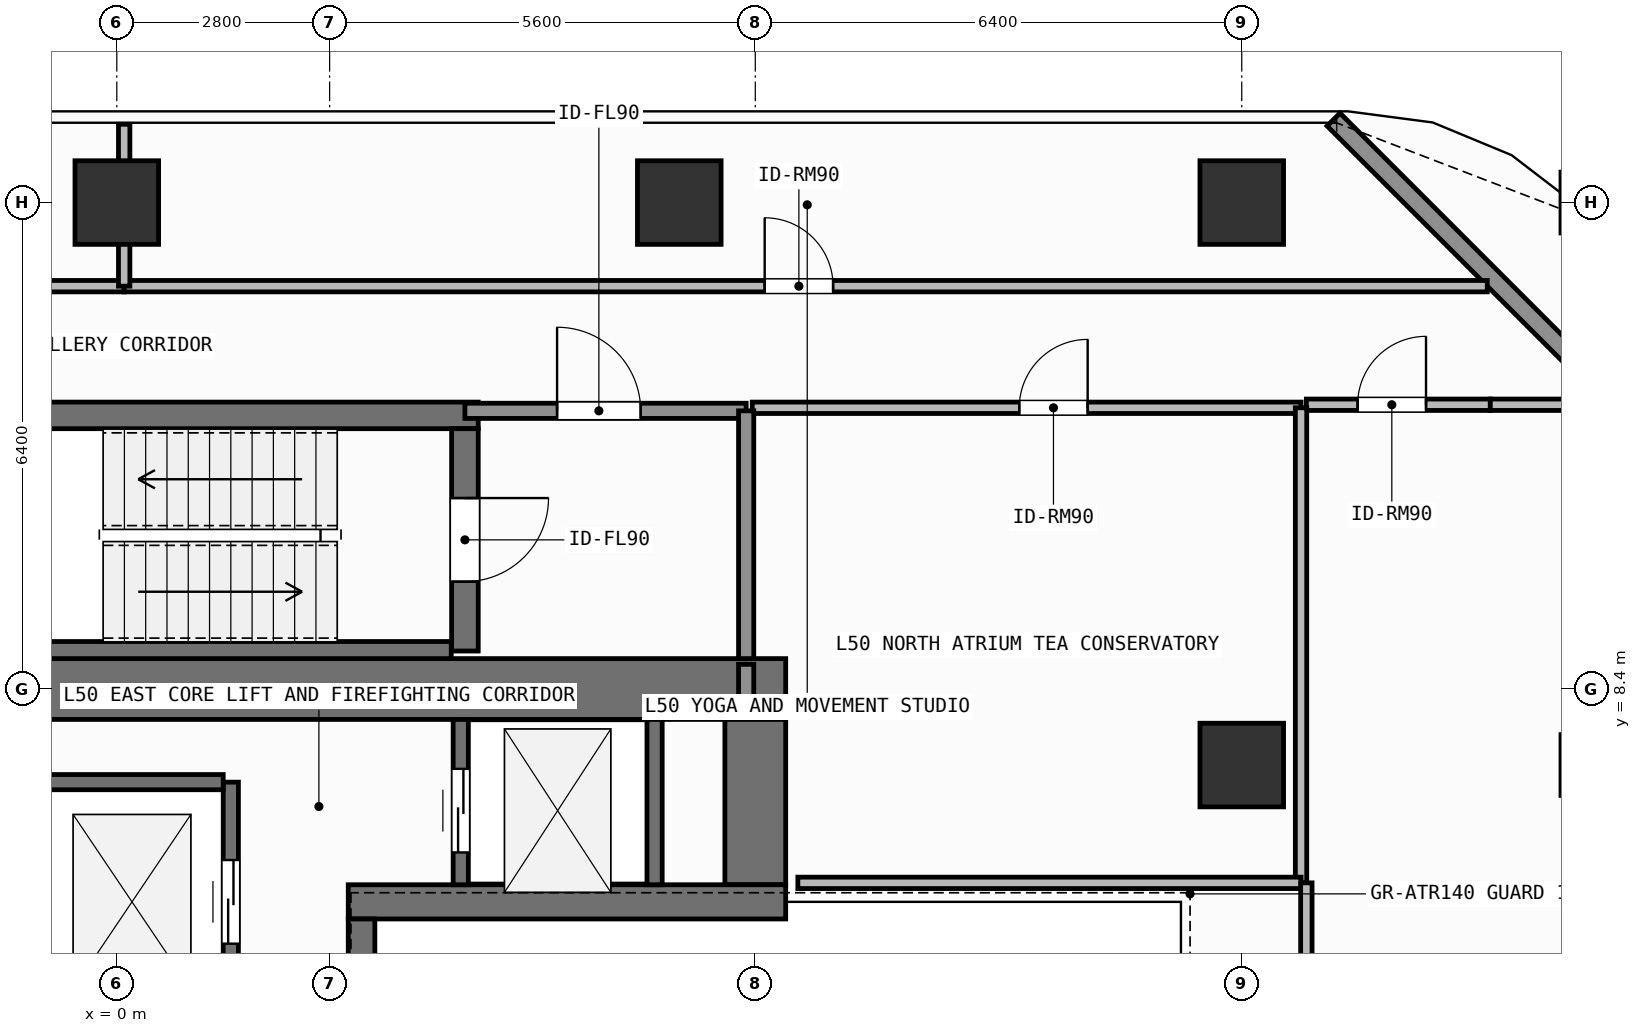
"""IFC4 building model, lengths in metres.
Left out: names, types, materials, properties, quantities, classifications, styles, units other than length and angle.
Written with IfcOpenShell. Run it as: python <this file> out.ifc"""

import sys

from ifc_helpers import new_model, si_unit, direction, frame, frame_2d, origin, origin_2d, place, context, subcontext, project, spatial, rectangle, hollow_rectangle, extrude, element, fill, save


model = new_model("IFC4")
c1 = context("Model", 3, precision=1e-05, world=origin(), true_north=direction((0.0, 1.0)))
c2 = subcontext(c1, "Body", "Model", "MODEL_VIEW")
j1 = project(units=[si_unit("LENGTHUNIT", "METRE"), si_unit("PLANEANGLEUNIT", "RADIAN")], contexts=[c1])
p1 = place(None, origin())
s1 = spatial("IfcSite", under=j1, at=p1, CompositionType="ELEMENT")
p2 = place(p1, origin())
s2 = spatial("IfcBuilding", under=s1, at=p2, CompositionType="ELEMENT")
p3 = place(p2, frame((0.0, 0.0, 203.1)))
s3 = spatial("IfcBuildingStorey", under=s2, at=p3, CompositionType="ELEMENT", Elevation=203.1)
p4 = place(p3, frame((-7.55, 8.4, 0.0), z_axis=(0.0, 0.0, 1.0), x_axis=(1.0, 0.0, 0.0)))
e1 = element("IfcWall", 1, at=p4, inside=s3, PredefinedType="SHEAR", context=c2, shape_type="SweptSolid", body=[
    extrude(rectangle(XDim=16.35, YDim=0.8, at=frame_2d((8.175, 0.0))), origin(), (0.0, 0.0, 1.0), 3.9),
])
p5 = place(p3, frame((8.4, 5.825, 0.0), z_axis=(0.0, 0.0, 1.0), x_axis=(0.0, 1.0, 0.0)))
e2 = element("IfcWall", 2, at=p5, inside=s3, PredefinedType="SHEAR", context=c2, shape_type="SweptSolid", body=[
    extrude(rectangle(XDim=2.175, YDim=0.8, at=frame_2d((1.087, 0.0))), origin(), (0.0, 0.0, 1.0), 3.9),
])
p6 = place(p3, frame((3.045, 5.6, 0.0), z_axis=(0.0, 0.0, 1.0), x_axis=(1.0, 0.0, 0.0)))
e3 = element("IfcWall", 3, at=p6, inside=s3, PredefinedType="SHEAR", context=c2, shape_type="SweptSolid", body=[
    extrude(rectangle(XDim=5.755, YDim=0.45, at=frame_2d((2.877, 0.0))), origin(), (0.0, 0.0, 1.0), 3.9),
])
p7 = place(p3, frame((3.22, -5.375, 0.0), z_axis=(0.0, 0.0, 1.0), x_axis=(0.0, 1.0, 0.0)))
e4 = element("IfcWall", 4, at=p7, inside=s3, PredefinedType="SHEAR", context=c2, shape_type="SweptSolid", body=[
    extrude(rectangle(XDim=10.75, YDim=0.35, at=frame_2d((5.375, 0.0))), origin(), (0.0, 0.0, 1.0), 3.9),
])
p8 = place(p3, frame((-2.555, 12.0, 0.0), z_axis=(0.0, 0.0, 1.0), x_axis=(1.0, 0.0, 0.0)))
e5 = element("IfcWall", 5, at=p8, inside=s3, PredefinedType="SHEAR", context=c2, shape_type="SweptSolid", body=[
    extrude(rectangle(XDim=7.31, YDim=0.35, at=frame_2d((3.655, 0.0))), origin(), (0.0, 0.0, 1.0), 3.9),
])
p9 = place(p3, frame((-2.2, 8.913, 0.0), z_axis=(0.0, 0.0, 1.0), x_axis=(1.0, 0.0, 0.0)))
e6 = element("IfcWall", 6, at=p9, inside=s3, PredefinedType="SHEAR", context=c2, shape_type="SweptSolid", body=[
    extrude(rectangle(XDim=6.6, YDim=0.225, at=frame_2d((3.3, 0.0))), origin(), (0.0, 0.0, 1.0), 3.9),
])
p10 = place(p3, frame((4.58, 11.825, 0.0), z_axis=(0.0, 0.0, 1.0), x_axis=(0.0, -1.0, 0.0)))
e7 = element("IfcWall", 7, at=p10, inside=s3, PredefinedType="SHEAR", context=c2, shape_type="SweptSolid", body=[
    extrude(rectangle(XDim=2.925, YDim=0.35, at=frame_2d((1.462, 0.0))), origin(), (0.0, 0.0, 1.0), 3.9),
])
p11 = place(p10, frame((0.913, 0.0, 0.0)))
e8 = element("IfcOpeningElement", 8, at=p11, cuts=e7, PredefinedType="OPENING", context=c2, shape_type="SweptSolid", body=[
    extrude(rectangle(XDim=1.1, YDim=2.15, at=frame_2d((0.55, 1.075))), frame((0.0, 0.185, 0.0), z_axis=(0.0, -1.0, 0.0), x_axis=(1.0, 0.0, 0.0)), (0.0, 0.0, 1.0), 0.37),
])
for number, where, z_axis, x_axis in (
    (9, (0.0, 14.8, 0.0), (0.0, 0.0, 1.0), (1.0, 0.0, 0.0)),
    (10, (7.4, 14.8, 0.0), (0.0, 0.0, 1.0), (1.0, 0.0, 0.0)),
    (11, (14.8, 14.8, 0.0), (0.0, 0.0, 1.0), (1.0, 0.0, 0.0)),
    (12, (14.8, 7.4, 0.0), (0.0, 0.0, 1.0), (1.0, 0.0, 0.0)),
):
    element("IfcColumn", number, at=place(p3, frame(where, z_axis=z_axis, x_axis=x_axis)), inside=s3, PredefinedType="COLUMN", context=c2, shape_type="SweptSolid", body=[
        extrude(rectangle(XDim=1.1, YDim=1.1, at=origin_2d()), origin(), (0.0, 0.0, 1.0), 3.9),
    ])
for number, where, z_axis, x_axis in (
    (13, (19.4, 7.4, 0.0), (0.0, 0.0, 1.0), (1.0, 0.0, 0.0)),
    (14, (19.4, 14.8, 0.0), (0.0, 0.0, 1.0), (1.0, 0.0, 0.0)),
):
    element("IfcColumn", number, at=place(p3, frame(where, z_axis=z_axis, x_axis=x_axis)), inside=s3, PredefinedType="COLUMN", context=c2, shape_type="SweptSolid", body=[
        extrude(hollow_rectangle(XDim=0.8, YDim=0.8, WallThickness=0.036, at=origin_2d()), origin(), (0.0, 0.0, 1.0), 3.9),
    ])
p12 = place(p3, frame((16.008, 15.892, 0.0), z_axis=(0.0, 0.0, 1.0), x_axis=(0.707106781187, -0.707106781187, 0.0)))
e15 = element("IfcWall", 15, at=p12, inside=s3, PredefinedType="SOLIDWALL", context=c2, shape_type="SweptSolid", body=[
    extrude(rectangle(XDim=6.201, YDim=0.24, at=frame_2d((3.101, 0.0))), origin(), (0.0, 0.0, 1.0), 3.68),
])
p13 = place(p3, frame((1.5, 4.025, 0.0), z_axis=(0.0, 0.0, 1.0), x_axis=(0.0, 1.0, 0.0)))
e16 = element("IfcWall", 16, at=p13, inside=s3, PredefinedType="SHEAR", context=c2, shape_type="SweptSolid", body=[
    extrude(rectangle(XDim=3.15, YDim=0.2, at=frame_2d((1.575, 0.0))), origin(), (0.0, 0.0, 1.0), 3.68),
])
p14 = place(p13, frame((1.025, 0.0, 0.0)))
e17 = element("IfcOpeningElement", 17, at=p14, cuts=e16, PredefinedType="OPENING", context=c2, shape_type="SweptSolid", body=[
    extrude(rectangle(XDim=1.1, YDim=2.2, at=frame_2d((0.55, 1.1))), frame((0.0, 0.11, 0.0), z_axis=(0.0, -1.0, 0.0), x_axis=(1.0, 0.0, 0.0)), (0.0, 0.0, 1.0), 0.22),
])
p15 = place(p3, frame((-1.0, 7.175, 0.0), z_axis=(0.0, 0.0, 1.0), x_axis=(1.0, 0.0, 0.0)))
e18 = element("IfcWall", 18, at=p15, inside=s3, PredefinedType="SHEAR", context=c2, shape_type="SweptSolid", body=[
    extrude(rectangle(XDim=2.4, YDim=0.2, at=frame_2d((1.2, 0.0))), origin(), (0.0, 0.0, 1.0), 3.68),
])
p16 = place(p3, frame((4.525, 5.825, 0.0), z_axis=(0.0, 0.0, 1.0), x_axis=(0.0, 1.0, 0.0)))
e19 = element("IfcWall", 19, at=p16, inside=s3, PredefinedType="SHEAR", context=c2, shape_type="SweptSolid", body=[
    extrude(rectangle(XDim=2.175, YDim=0.2, at=frame_2d((1.087, 0.0))), origin(), (0.0, 0.0, 1.0), 3.68),
])
p17 = place(p16, frame((0.425, 0.0, 0.0)))
e20 = element("IfcOpeningElement", 20, at=p17, cuts=e19, PredefinedType="OPENING", context=c2, shape_type="SweptSolid", body=[
    extrude(rectangle(XDim=1.1, YDim=2.2, at=frame_2d((0.55, 1.1))), frame((0.0, 0.11, 0.0), z_axis=(0.0, -1.0, 0.0), x_axis=(1.0, 0.0, 0.0)), (0.0, 0.0, 1.0), 0.22),
])
p18 = place(p3, frame((7.075, 5.825, 0.0), z_axis=(0.0, 0.0, 1.0), x_axis=(0.0, 1.0, 0.0)))
e21 = element("IfcWall", 21, at=p18, inside=s3, PredefinedType="SHEAR", context=c2, shape_type="SweptSolid", body=[
    extrude(rectangle(XDim=2.175, YDim=0.2, at=frame_2d((1.087, 0.0))), origin(), (0.0, 0.0, 1.0), 3.68),
])
p19 = place(p3, frame((4.58, 12.06, 0.0), z_axis=(0.0, 0.0, 1.0), x_axis=(1.0, 0.0, 0.0)))
e22 = element("IfcWall", 22, at=p19, inside=s3, PredefinedType="SOLIDWALL", context=c2, shape_type="SweptSolid", body=[
    extrude(rectangle(XDim=3.7, YDim=0.2, at=frame_2d((1.85, 0.0))), origin(), (0.0, 0.0, 1.0), 3.68),
])
p20 = place(p19, frame((1.212, 0.0, 0.0)))
e23 = element("IfcOpeningElement", 23, at=p20, cuts=e22, PredefinedType="OPENING", context=c2, shape_type="SweptSolid", body=[
    extrude(rectangle(XDim=1.1, YDim=2.15, at=frame_2d((0.55, 1.075))), frame((0.0, 0.11, 0.0), z_axis=(0.0, -1.0, 0.0), x_axis=(1.0, 0.0, 0.0)), (0.0, 0.0, 1.0), 0.22),
])
p21 = place(p3, frame((8.36, 12.1, 0.0), z_axis=(0.0, 0.0, 1.0), x_axis=(1.0, 0.0, 0.0)))
e24 = element("IfcWall", 24, at=p21, inside=s3, PredefinedType="PARTITIONING", context=c2, shape_type="SweptSolid", body=[
    extrude(rectangle(XDim=7.22, YDim=0.15, at=frame_2d((3.61, 0.0))), origin(), (0.0, 0.0, 1.0), 3.68),
])
p22 = place(p21, frame((3.513, 0.0, 0.0)))
e25 = element("IfcOpeningElement", 25, at=p22, cuts=e24, PredefinedType="OPENING", context=c2, shape_type="SweptSolid", body=[
    extrude(rectangle(XDim=0.9, YDim=2.1, at=frame_2d((0.45, 1.05))), frame((0.0, 0.085, 0.0), z_axis=(0.0, -1.0, 0.0), x_axis=(1.0, 0.0, 0.0)), (0.0, 0.0, 1.0), 0.17),
])
p23 = place(p3, frame((-13.483, 13.7, 0.0), z_axis=(0.0, 0.0, 1.0), x_axis=(1.0, 0.0, 0.0)))
e26 = element("IfcWall", 26, at=p23, inside=s3, PredefinedType="PARTITIONING", context=c2, shape_type="SweptSolid", body=[
    extrude(rectangle(XDim=13.58, YDim=0.15, at=frame_2d((6.79, 0.0))), origin(), (0.0, 0.0, 1.0), 3.68),
])
p24 = place(p23, frame((6.788, 0.0, 0.0)))
e27 = element("IfcOpeningElement", 27, at=p24, cuts=e26, PredefinedType="OPENING", context=c2, shape_type="SweptSolid", body=[
    extrude(rectangle(XDim=0.9, YDim=2.1, at=frame_2d((0.45, 1.05))), frame((0.0, 0.085, 0.0), z_axis=(0.0, -1.0, 0.0), x_axis=(1.0, 0.0, 0.0)), (0.0, 0.0, 1.0), 0.17),
])
p25 = place(p3, frame((0.097, 13.7, 0.0), z_axis=(0.0, 0.0, 1.0), x_axis=(1.0, 0.0, 0.0)))
e28 = element("IfcWall", 28, at=p25, inside=s3, PredefinedType="PARTITIONING", context=c2, shape_type="SweptSolid", body=[
    extrude(rectangle(XDim=17.933, YDim=0.15, at=frame_2d((8.967, 0.0))), origin(), (0.0, 0.0, 1.0), 3.68),
])
p26 = place(p25, frame((8.427, 0.0, 0.0)))
e29 = element("IfcOpeningElement", 29, at=p26, cuts=e28, PredefinedType="OPENING", context=c2, shape_type="SweptSolid", body=[
    extrude(rectangle(XDim=0.9, YDim=2.1, at=frame_2d((0.45, 1.05))), frame((0.0, 0.085, 0.0), z_axis=(0.0, -1.0, 0.0), x_axis=(1.0, 0.0, 0.0)), (0.0, 0.0, 1.0), 0.17),
])
p27 = place(p3, frame((15.65, 12.14, 0.0), z_axis=(0.0, 0.0, 1.0), x_axis=(1.0, 0.0, 0.0)))
e30 = element("IfcWall", 30, at=p27, inside=s3, PredefinedType="PARTITIONING", context=c2, shape_type="SweptSolid", body=[
    extrude(rectangle(XDim=2.42, YDim=0.15, at=frame_2d((1.21, 0.0))), origin(), (0.0, 0.0, 1.0), 3.68),
])
p28 = place(p27, frame((0.674, 0.0, 0.0)))
e31 = element("IfcOpeningElement", 31, at=p28, cuts=e30, PredefinedType="OPENING", context=c2, shape_type="SweptSolid", body=[
    extrude(rectangle(XDim=0.9, YDim=2.1, at=frame_2d((0.45, 1.05))), frame((0.0, 0.085, 0.0), z_axis=(0.0, -1.0, 0.0), x_axis=(1.0, 0.0, 0.0)), (0.0, 0.0, 1.0), 0.17),
])
p29 = place(p3, frame((8.28, 8.8, 0.0), z_axis=(0.0, 0.0, 1.0), x_axis=(0.0, 1.0, 0.0)))
e32 = element("IfcWall", 32, at=p29, inside=s3, PredefinedType="SOLIDWALL", context=c2, shape_type="SweptSolid", body=[
    extrude(rectangle(XDim=3.26, YDim=0.2, at=frame_2d((1.63, 0.0))), origin(), (0.0, 0.0, 1.0), 3.68),
])
p30 = place(p3, frame((8.28, 8.1, 0.0), z_axis=(0.0, 0.0, 1.0), x_axis=(0.0, 1.0, 0.0)))
e33 = element("IfcWall", 33, at=p30, inside=s3, PredefinedType="SOLIDWALL", context=c2, shape_type="SweptSolid", body=[
    extrude(rectangle(XDim=0.625, YDim=0.2, at=frame_2d((0.312, 0.0))), origin(), (0.0, 0.0, 1.0), 3.68),
])
p31 = place(p3, frame((15.58, 5.85, 0.0), z_axis=(0.0, 0.0, 1.0), x_axis=(0.0, 1.0, 0.0)))
e34 = element("IfcWall", 34, at=p31, inside=s3, PredefinedType="PARTITIONING", context=c2, shape_type="SweptSolid", body=[
    extrude(rectangle(XDim=6.25, YDim=0.15, at=frame_2d((3.125, 0.0))), origin(), (0.0, 0.0, 1.0), 3.68),
])
p32 = place(p3, frame((8.96, 5.85, 0.0), z_axis=(0.0, 0.0, 1.0), x_axis=(1.0, 0.0, 0.0)))
e35 = element("IfcWall", 35, at=p32, inside=s3, PredefinedType="PARTITIONING", context=c2, shape_type="SweptSolid", body=[
    extrude(rectangle(XDim=6.62, YDim=0.15, at=frame_2d((3.31, 0.0))), origin(), (0.0, 0.0, 1.0), 3.68),
])
p33 = place(p3, frame((0.097, 13.7, 0.0), z_axis=(0.0, 0.0, 1.0), x_axis=(0.0, 1.0, 0.0)))
e36 = element("IfcWall", 36, at=p33, inside=s3, PredefinedType="PARTITIONING", context=c2, shape_type="SweptSolid", body=[
    extrude(rectangle(XDim=2.13, YDim=0.15, at=frame_2d((1.065, 0.0))), origin(), (0.0, 0.0, 1.0), 3.68),
])
p34 = place(p3, frame((15.65, -2.75, 0.0), z_axis=(0.0, 0.0, 1.0), x_axis=(0.0, 1.0, 0.0)))
e37 = element("IfcWall", 37, at=p34, inside=s3, PredefinedType="PARTITIONING", context=c2, shape_type="SweptSolid", body=[
    extrude(rectangle(XDim=8.6, YDim=0.15, at=frame_2d((4.3, 0.0))), origin(), (0.0, 0.0, 1.0), 3.68),
])
p35 = place(p3, frame((18.07, 12.14, 0.0), z_axis=(0.0, 0.0, 1.0), x_axis=(1.0, 0.0, 0.0)))
e38 = element("IfcWall", 38, at=p35, inside=s3, PredefinedType="PARTITIONING", context=c2, shape_type="SweptSolid", body=[
    extrude(rectangle(XDim=1.52, YDim=0.15, at=frame_2d((0.76, 0.0))), origin(), (0.0, 0.0, 1.0), 3.68),
])
p36 = place(p14, origin())
e39 = element("IfcDoor", 39, at=p36, inside=s3, OperationType="SLIDING_TO_LEFT", PredefinedType="DOOR", context=c2, shape_type="SweptSolid", body=[
    extrude(rectangle(XDim=1.1, YDim=2.2, at=frame_2d((0.55, 1.1))), frame((0.0, 0.025, 0.0), z_axis=(0.0, -1.0, 0.0), x_axis=(1.0, 0.0, 0.0)), (0.0, 0.0, 1.0), 0.05),
])
fill(e17, e39)
p37 = place(p17, origin())
e40 = element("IfcDoor", 40, at=p37, inside=s3, OperationType="SLIDING_TO_LEFT", PredefinedType="DOOR", context=c2, shape_type="SweptSolid", body=[
    extrude(rectangle(XDim=1.1, YDim=2.2, at=frame_2d((0.55, 1.1))), frame((0.0, 0.025, 0.0), z_axis=(0.0, -1.0, 0.0), x_axis=(1.0, 0.0, 0.0)), (0.0, 0.0, 1.0), 0.05),
])
fill(e20, e40)
p38 = place(p11, origin())
e41 = element("IfcDoor", 41, at=p38, inside=s3, OperationType="SINGLE_SWING_LEFT", PredefinedType="DOOR", context=c2, shape_type="SweptSolid", body=[
    extrude(rectangle(XDim=1.1, YDim=2.15, at=frame_2d((0.55, 1.075))), frame((0.0, 0.025, 0.0), z_axis=(0.0, -1.0, 0.0), x_axis=(1.0, 0.0, 0.0)), (0.0, 0.0, 1.0), 0.05),
])
fill(e8, e41)
p39 = place(p20, origin())
e42 = element("IfcDoor", 42, at=p39, inside=s3, OperationType="SINGLE_SWING_LEFT", PredefinedType="DOOR", context=c2, shape_type="SweptSolid", body=[
    extrude(rectangle(XDim=1.1, YDim=2.15, at=frame_2d((0.55, 1.075))), frame((0.0, 0.025, 0.0), z_axis=(0.0, -1.0, 0.0), x_axis=(1.0, 0.0, 0.0)), (0.0, 0.0, 1.0), 0.05),
])
fill(e23, e42)
p40 = place(p22, origin())
e43 = element("IfcDoor", 43, at=p40, inside=s3, OperationType="SINGLE_SWING_RIGHT", PredefinedType="DOOR", context=c2, shape_type="SweptSolid", body=[
    extrude(rectangle(XDim=0.9, YDim=2.1, at=frame_2d((0.45, 1.05))), frame((0.0, 0.025, 0.0), z_axis=(0.0, -1.0, 0.0), x_axis=(1.0, 0.0, 0.0)), (0.0, 0.0, 1.0), 0.05),
])
fill(e25, e43)
p41 = place(p26, origin())
e44 = element("IfcDoor", 44, at=p41, inside=s3, OperationType="SINGLE_SWING_LEFT", PredefinedType="DOOR", context=c2, shape_type="SweptSolid", body=[
    extrude(rectangle(XDim=0.9, YDim=2.1, at=frame_2d((0.45, 1.05))), frame((0.0, 0.025, 0.0), z_axis=(0.0, -1.0, 0.0), x_axis=(1.0, 0.0, 0.0)), (0.0, 0.0, 1.0), 0.05),
])
fill(e29, e44)
p42 = place(p28, origin())
e45 = element("IfcDoor", 45, at=p42, inside=s3, OperationType="SINGLE_SWING_RIGHT", PredefinedType="DOOR", context=c2, shape_type="SweptSolid", body=[
    extrude(rectangle(XDim=0.9, YDim=2.1, at=frame_2d((0.45, 1.05))), frame((0.0, 0.025, 0.0), z_axis=(0.0, -1.0, 0.0), x_axis=(1.0, 0.0, 0.0)), (0.0, 0.0, 1.0), 0.05),
])
fill(e31, e45)
save(model, sys.argv[1])
